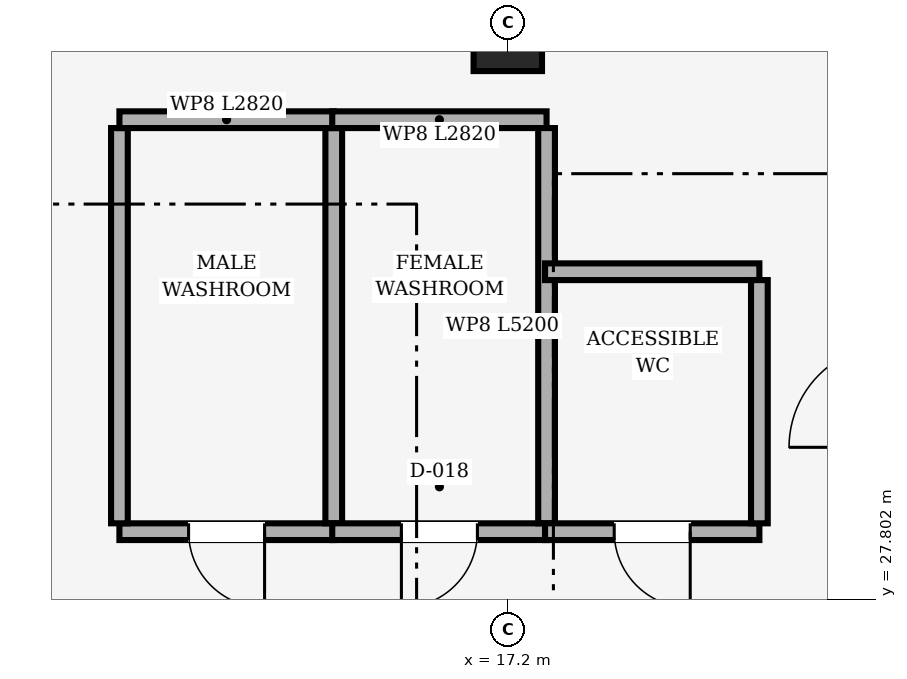
"""IFC4 building model, lengths in metres.
Left out: names, types, materials, properties, quantities, classifications, styles, units other than length and angle.
Written with IfcOpenShell. Run it as: python <this file> out.ifc"""

import sys

from ifc_helpers import new_model, si_unit, direction, frame, frame_2d, origin, origin_2d, place, context, subcontext, project, spatial, rectangle, extrude, element, fill, save


model = new_model("IFC4")
c1 = context("Model", 3, precision=1e-05, world=origin(), true_north=direction((0.0, 1.0)))
c2 = subcontext(c1, "Body", "Model", "MODEL_VIEW")
j1 = project(units=[si_unit("LENGTHUNIT", "METRE"), si_unit("PLANEANGLEUNIT", "RADIAN")], contexts=[c1])
p1 = place(None, origin())
s1 = spatial("IfcSite", under=j1, at=p1, CompositionType="ELEMENT")
p2 = place(p1, origin())
s2 = spatial("IfcBuilding", under=s1, at=p2, CompositionType="ELEMENT")
p3 = place(p2, origin())
s3 = spatial("IfcBuildingStorey", under=s2, at=p3, CompositionType="ELEMENT", Elevation=0.0)
p4 = place(p3, frame((17.2, 35.2, 0.0), z_axis=(0.0, 0.0, 1.0), x_axis=(1.0, 0.0, 0.0)))
e1 = element("IfcColumn", 1, at=p4, inside=s3, PredefinedType="COLUMN", context=c2, shape_type="SweptSolid", body=[
    extrude(rectangle(XDim=0.9, YDim=0.9, at=origin_2d()), origin(), (0.0, 0.0, 1.0), 4.25),
])
p5 = place(p3, frame((14.91, 28.69, 0.0), z_axis=(0.0, 0.0, 1.0), x_axis=(-1.0, 0.0, 0.0)))
e2 = element("IfcWall", 2, at=p5, inside=s3, PredefinedType="PLUMBINGWALL", context=c2, shape_type="SweptSolid", body=[
    extrude(rectangle(XDim=2.82, YDim=0.22, at=frame_2d((1.41, 0.0))), origin(), (0.0, 0.0, 1.0), 4.23),
])
p6 = place(p5, frame((0.91, 0.0, 0.0)))
e3 = element("IfcOpeningElement", 3, at=p6, cuts=e2, PredefinedType="OPENING", context=c2, shape_type="SweptSolid", body=[
    extrude(rectangle(XDim=1.0, YDim=2.1, at=frame_2d((0.5, 1.05))), frame((0.0, 0.11, 0.0), z_axis=(0.0, -1.0, 0.0), x_axis=(1.0, 0.0, 0.0)), (0.0, 0.0, 1.0), 0.22),
])
p7 = place(p3, frame((12.09, 28.8, 0.0), z_axis=(0.0, 0.0, 1.0), x_axis=(0.0, 1.0, 0.0)))
e4 = element("IfcWall", 4, at=p7, inside=s3, PredefinedType="PLUMBINGWALL", context=c2, shape_type="SweptSolid", body=[
    extrude(rectangle(XDim=5.2, YDim=0.22, at=frame_2d((2.6, 0.0))), origin(), (0.0, 0.0, 1.0), 4.23),
])
p8 = place(p3, frame((12.09, 34.11, 0.0), z_axis=(0.0, 0.0, 1.0), x_axis=(1.0, 0.0, 0.0)))
e5 = element("IfcWall", 5, at=p8, inside=s3, PredefinedType="PLUMBINGWALL", context=c2, shape_type="SweptSolid", body=[
    extrude(rectangle(XDim=2.82, YDim=0.22, at=frame_2d((1.41, 0.0))), origin(), (0.0, 0.0, 1.0), 4.23),
])
p9 = place(p3, frame((14.91, 34.0, 0.0), z_axis=(0.0, 0.0, 1.0), x_axis=(0.0, -1.0, 0.0)))
e6 = element("IfcWall", 6, at=p9, inside=s3, PredefinedType="PLUMBINGWALL", context=c2, shape_type="SweptSolid", body=[
    extrude(rectangle(XDim=5.2, YDim=0.22, at=frame_2d((2.6, 0.0))), origin(), (0.0, 0.0, 1.0), 4.23),
])
p10 = place(p3, frame((17.71, 28.69, 0.0), z_axis=(0.0, 0.0, 1.0), x_axis=(-1.0, 0.0, 0.0)))
e7 = element("IfcWall", 7, at=p10, inside=s3, PredefinedType="PLUMBINGWALL", context=c2, shape_type="SweptSolid", body=[
    extrude(rectangle(XDim=2.82, YDim=0.22, at=frame_2d((1.41, 0.0))), origin(), (0.0, 0.0, 1.0), 4.23),
])
p11 = place(p10, frame((0.91, 0.0, 0.0)))
e8 = element("IfcOpeningElement", 8, at=p11, cuts=e7, PredefinedType="OPENING", context=c2, shape_type="SweptSolid", body=[
    extrude(rectangle(XDim=1.0, YDim=2.1, at=frame_2d((0.5, 1.05))), frame((0.0, 0.11, 0.0), z_axis=(0.0, -1.0, 0.0), x_axis=(1.0, 0.0, 0.0)), (0.0, 0.0, 1.0), 0.22),
])
p12 = place(p3, frame((14.89, 34.11, 0.0), z_axis=(0.0, 0.0, 1.0), x_axis=(1.0, 0.0, 0.0)))
e9 = element("IfcWall", 9, at=p12, inside=s3, PredefinedType="PLUMBINGWALL", context=c2, shape_type="SweptSolid", body=[
    extrude(rectangle(XDim=2.82, YDim=0.22, at=frame_2d((1.41, 0.0))), origin(), (0.0, 0.0, 1.0), 4.23),
])
p13 = place(p3, frame((17.71, 34.0, 0.0), z_axis=(0.0, 0.0, 1.0), x_axis=(0.0, -1.0, 0.0)))
e10 = element("IfcWall", 10, at=p13, inside=s3, PredefinedType="PLUMBINGWALL", context=c2, shape_type="SweptSolid", body=[
    extrude(rectangle(XDim=5.2, YDim=0.22, at=frame_2d((2.6, 0.0))), origin(), (0.0, 0.0, 1.0), 4.23),
])
p14 = place(p3, frame((20.51, 28.69, 0.0), z_axis=(0.0, 0.0, 1.0), x_axis=(-1.0, 0.0, 0.0)))
e11 = element("IfcWall", 11, at=p14, inside=s3, PredefinedType="PLUMBINGWALL", context=c2, shape_type="SweptSolid", body=[
    extrude(rectangle(XDim=2.82, YDim=0.22, at=frame_2d((1.41, 0.0))), origin(), (0.0, 0.0, 1.0), 4.23),
])
p15 = place(p14, frame((0.91, 0.0, 0.0)))
e12 = element("IfcOpeningElement", 12, at=p15, cuts=e11, PredefinedType="OPENING", context=c2, shape_type="SweptSolid", body=[
    extrude(rectangle(XDim=1.0, YDim=2.1, at=frame_2d((0.5, 1.05))), frame((0.0, 0.11, 0.0), z_axis=(0.0, -1.0, 0.0), x_axis=(1.0, 0.0, 0.0)), (0.0, 0.0, 1.0), 0.22),
])
p16 = place(p3, frame((17.69, 32.11, 0.0), z_axis=(0.0, 0.0, 1.0), x_axis=(1.0, 0.0, 0.0)))
e13 = element("IfcWall", 13, at=p16, inside=s3, PredefinedType="PLUMBINGWALL", context=c2, shape_type="SweptSolid", body=[
    extrude(rectangle(XDim=2.82, YDim=0.22, at=frame_2d((1.41, 0.0))), origin(), (0.0, 0.0, 1.0), 4.23),
])
p17 = place(p3, frame((20.51, 32.0, 0.0), z_axis=(0.0, 0.0, 1.0), x_axis=(0.0, -1.0, 0.0)))
e14 = element("IfcWall", 14, at=p17, inside=s3, PredefinedType="PLUMBINGWALL", context=c2, shape_type="SweptSolid", body=[
    extrude(rectangle(XDim=3.2, YDim=0.22, at=frame_2d((1.6, 0.0))), origin(), (0.0, 0.0, 1.0), 4.23),
])
p18 = place(p6, origin())
e15 = element("IfcDoor", 15, at=p18, inside=s3, OperationType="SINGLE_SWING_LEFT", PredefinedType="DOOR", context=c2, shape_type="SweptSolid", body=[
    extrude(rectangle(XDim=1.0, YDim=2.1, at=frame_2d((0.5, 1.05))), frame((0.0, 0.025, 0.0), z_axis=(0.0, -1.0, 0.0), x_axis=(1.0, 0.0, 0.0)), (0.0, 0.0, 1.0), 0.05),
])
fill(e3, e15)
p19 = place(p11, origin())
e16 = element("IfcDoor", 16, at=p19, inside=s3, OperationType="SINGLE_SWING_RIGHT", PredefinedType="DOOR", context=c2, shape_type="SweptSolid", body=[
    extrude(rectangle(XDim=1.0, YDim=2.1, at=frame_2d((0.5, 1.05))), frame((0.0, 0.025, 0.0), z_axis=(0.0, -1.0, 0.0), x_axis=(1.0, 0.0, 0.0)), (0.0, 0.0, 1.0), 0.05),
])
fill(e8, e16)
p20 = place(p15, origin())
e17 = element("IfcDoor", 17, at=p20, inside=s3, OperationType="SINGLE_SWING_LEFT", PredefinedType="DOOR", context=c2, shape_type="SweptSolid", body=[
    extrude(rectangle(XDim=1.0, YDim=2.1, at=frame_2d((0.5, 1.05))), frame((0.0, 0.025, 0.0), z_axis=(0.0, -1.0, 0.0), x_axis=(1.0, 0.0, 0.0)), (0.0, 0.0, 1.0), 0.05),
])
fill(e12, e17)
save(model, sys.argv[1])
